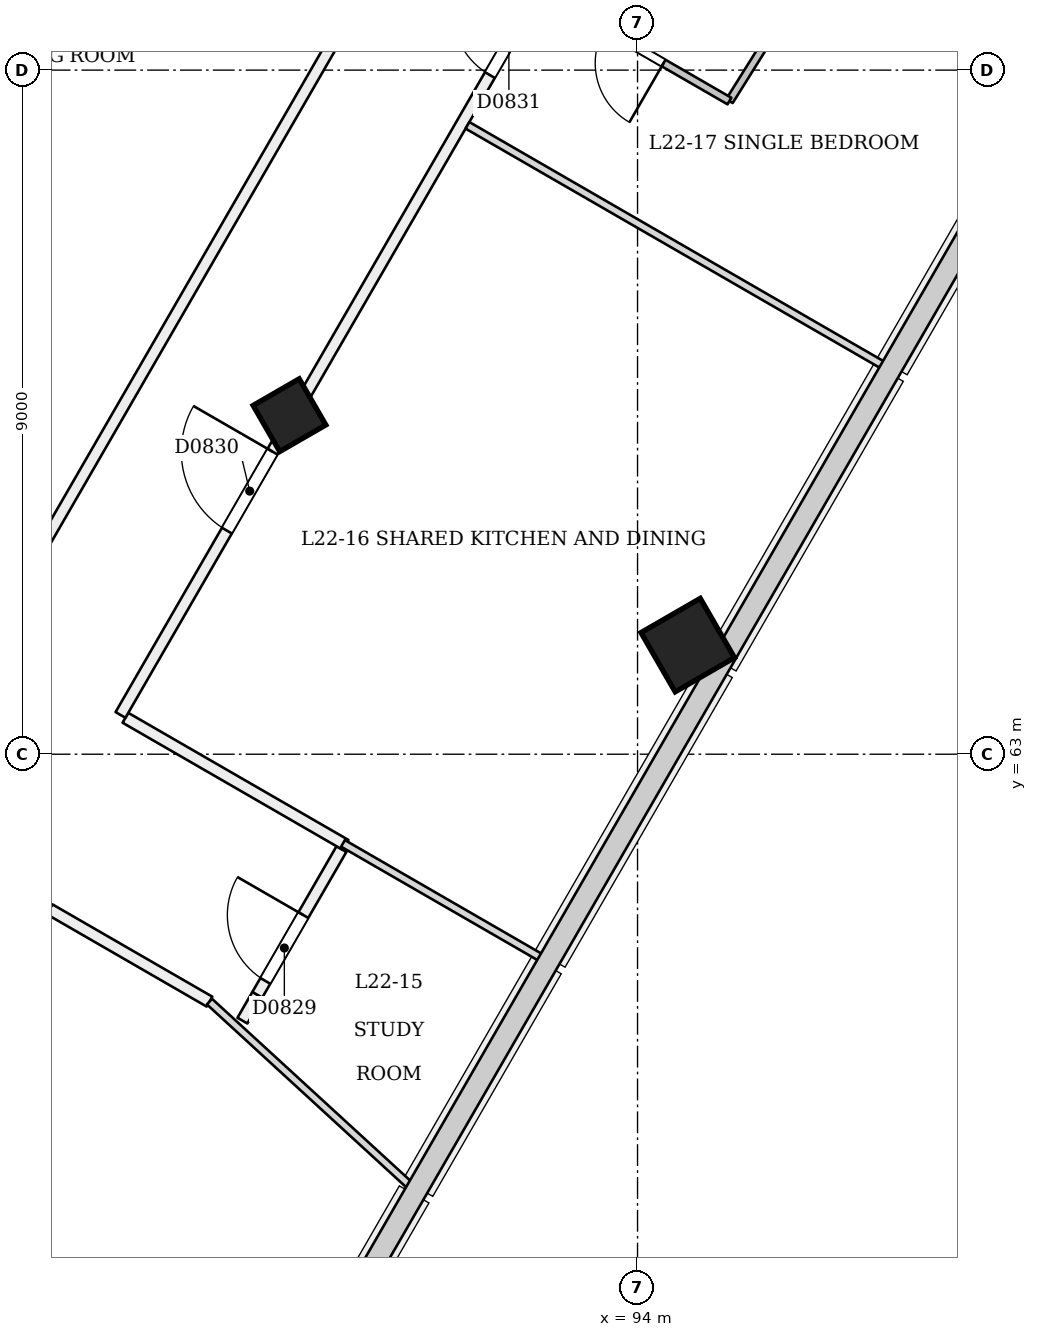
"""IFC4 building model, lengths in metres.
Left out: names, types, materials, properties, quantities, classifications, styles, units other than length and angle.
Written with IfcOpenShell. Run it as: python <this file> out.ifc"""

import sys

from ifc_helpers import new_model, si_unit, direction, frame, frame_2d, origin, origin_2d, place, context, subcontext, project, spatial, rectangle, extrude, element, fill, save


model = new_model("IFC4")
c1 = context("Model", 3, precision=1e-05, world=origin(), true_north=direction((0.0, 1.0)))
c2 = subcontext(c1, "Body", "Model", "MODEL_VIEW")
j1 = project(units=[si_unit("LENGTHUNIT", "METRE"), si_unit("PLANEANGLEUNIT", "RADIAN")], contexts=[c1])
p1 = place(None, origin())
s1 = spatial("IfcSite", under=j1, at=p1, CompositionType="ELEMENT")
p2 = place(p1, origin())
s2 = spatial("IfcBuilding", under=s1, at=p2, CompositionType="ELEMENT")
p3 = place(p2, frame((0.0, 0.0, 88.2)))
s3 = spatial("IfcBuildingStorey", under=s2, at=p3, CompositionType="ELEMENT", Elevation=88.2)
p4 = place(p3, frame((89.448, 67.413, -0.021), z_axis=(-0.02222134892, 0.038480872521, 0.999012229206), x_axis=(-0.500169969809, -0.865642163156, 0.022218160761)))
e1 = element("IfcColumn", 1, at=p4, inside=s3, PredefinedType="COLUMN", context=c2, shape_type="SweptSolid", body=[
    extrude(rectangle(XDim=0.7, YDim=0.7, at=origin_2d()), origin(), (0.0, 0.0, 1.0), 3.604),
])
p5 = place(p3, frame((94.688, 64.388, -0.027), z_axis=(-0.02215369191, 0.038413282303, 0.999016333038), x_axis=(-0.500652789846, -0.865364193428, 0.022171981242)))
e2 = element("IfcColumn", 2, at=p5, inside=s3, PredefinedType="COLUMN", context=c2, shape_type="SweptSolid", body=[
    extrude(rectangle(XDim=0.9, YDim=0.9, at=origin_2d()), origin(), (0.0, 0.0, 1.0), 3.604),
])
p6 = place(p3, frame((86.265, 60.96, 0.0), z_axis=(0.0, 0.0, 1.0), x_axis=(0.866026590519, -0.499997944509, 0.0)))
e3 = element("IfcWall", 3, at=p6, inside=s3, PredefinedType="PARTITIONING", context=c2, shape_type="SweptSolid", body=[
    extrude(rectangle(XDim=2.429, YDim=0.15, at=frame_2d((1.215, 0.0))), origin(), (0.0, 0.0, 1.0), 3.1),
])
p7 = place(p3, frame((88.802, 59.495, 0.0), z_axis=(0.0, 0.0, 1.0), x_axis=(0.500153222552, 0.865936922628, 0.0)))
e4 = element("IfcWall", 4, at=p7, inside=s3, PredefinedType="PARTITIONING", context=c2, shape_type="SweptSolid", body=[
    extrude(rectangle(XDim=0.393, YDim=0.15, at=frame_2d((0.196, 0.0))), origin(), (0.0, 0.0, 1.0), 2.6),
])
p8 = place(p3, frame((88.998, 59.835, 0.0), z_axis=(0.0, 0.0, 1.0), x_axis=(0.499970690241, 0.86604232512, 0.0)))
e5 = element("IfcWall", 5, at=p8, inside=s3, PredefinedType="PARTITIONING", context=c2, shape_type="SweptSolid", body=[
    extrude(rectangle(XDim=2.214, YDim=0.15, at=frame_2d((1.107, 0.0))), origin(), (0.0, 0.0, 1.0), 3.1),
])
p9 = place(p8, frame((0.211, 0.0, 0.0)))
e6 = element("IfcOpeningElement", 6, at=p9, cuts=e5, PredefinedType="OPENING", context=c2, shape_type="SweptSolid", body=[
    extrude(rectangle(XDim=1.0, YDim=2.1, at=frame_2d((0.5, 1.05))), frame((0.0, 0.085, 0.0), z_axis=(0.0, -1.0, 0.0), x_axis=(1.0, 0.0, 0.0)), (0.0, 0.0, 1.0), 0.171),
])
p10 = place(p3, frame((90.159, 61.807, 0.0), z_axis=(0.0, 0.0, 1.0), x_axis=(-0.866051895906, 0.499954111491, 0.0)))
e7 = element("IfcWall", 7, at=p10, inside=s3, PredefinedType="PARTITIONING", context=c2, shape_type="SweptSolid", body=[
    extrude(rectangle(XDim=3.345, YDim=0.15, at=frame_2d((1.672, 0.0))), origin(), (0.0, 0.0, 1.0), 3.1),
])
p11 = place(p3, frame((87.198, 63.517, 0.0), z_axis=(0.0, 0.0, 1.0), x_axis=(0.499999136801, 0.866025902152, 0.0)))
e8 = element("IfcWall", 8, at=p11, inside=s3, PredefinedType="PARTITIONING", context=c2, shape_type="SweptSolid", body=[
    extrude(rectangle(XDim=39.209, YDim=0.15, at=frame_2d((19.604, 0.0))), origin(), (0.0, 0.0, 1.0), 2.7),
])
p12 = place(p11, frame((2.8, 0.0, 0.0)))
e9 = element("IfcOpeningElement", 9, at=p12, cuts=e8, PredefinedType="OPENING", context=c2, shape_type="SweptSolid", body=[
    extrude(rectangle(XDim=1.2, YDim=2.1, at=frame_2d((0.6, 1.05))), frame((0.0, 0.085, 0.0), z_axis=(0.0, -1.0, 0.0), x_axis=(1.0, 0.0, 0.0)), (0.0, 0.0, 1.0), 0.171),
])
p13 = place(p11, frame((9.72, 0.0, 0.0)))
e10 = element("IfcOpeningElement", 10, at=p13, cuts=e8, PredefinedType="OPENING", context=c2, shape_type="SweptSolid", body=[
    extrude(rectangle(XDim=1.0, YDim=2.1, at=frame_2d((0.5, 1.05))), frame((0.0, 0.085, 0.0), z_axis=(0.0, -1.0, 0.0), x_axis=(1.0, 0.0, 0.0)), (0.0, 0.0, 1.0), 0.171),
])
p14 = place(p11, frame((16.395, 0.0, 0.0)))
e11 = element("IfcOpeningElement", 11, at=p14, cuts=e8, PredefinedType="OPENING", context=c2, shape_type="SweptSolid", body=[
    extrude(rectangle(XDim=1.0, YDim=2.1, at=frame_2d((0.5, 1.05))), frame((0.0, 0.085, 0.0), z_axis=(0.0, -1.0, 0.0), x_axis=(1.0, 0.0, 0.0)), (0.0, 0.0, 1.0), 0.171),
])
p15 = place(p11, frame((19.75, 0.0, 0.0)))
e12 = element("IfcOpeningElement", 12, at=p15, cuts=e8, PredefinedType="OPENING", context=c2, shape_type="SweptSolid", body=[
    extrude(rectangle(XDim=1.0, YDim=2.1, at=frame_2d((0.5, 1.05))), frame((0.0, 0.085, 0.0), z_axis=(0.0, -1.0, 0.0), x_axis=(1.0, 0.0, 0.0)), (0.0, 0.0, 1.0), 0.171),
])
p16 = place(p11, frame((25.395, 0.0, 0.0)))
e13 = element("IfcOpeningElement", 13, at=p16, cuts=e8, PredefinedType="OPENING", context=c2, shape_type="SweptSolid", body=[
    extrude(rectangle(XDim=1.0, YDim=2.1, at=frame_2d((0.5, 1.05))), frame((0.0, 0.085, 0.0), z_axis=(0.0, -1.0, 0.0), x_axis=(1.0, 0.0, 0.0)), (0.0, 0.0, 1.0), 0.171),
])
p17 = place(p11, frame((29.8, 0.0, 0.0)))
e14 = element("IfcOpeningElement", 14, at=p17, cuts=e8, PredefinedType="OPENING", context=c2, shape_type="SweptSolid", body=[
    extrude(rectangle(XDim=1.2, YDim=2.1, at=frame_2d((0.6, 1.05))), frame((0.0, 0.085, 0.0), z_axis=(0.0, -1.0, 0.0), x_axis=(1.0, 0.0, 0.0)), (0.0, 0.0, 1.0), 0.171),
])
p18 = place(p11, frame((37.225, 0.0, 0.0)))
e15 = element("IfcOpeningElement", 15, at=p18, cuts=e8, PredefinedType="OPENING", context=c2, shape_type="SweptSolid", body=[
    extrude(rectangle(XDim=1.0, YDim=2.1, at=frame_2d((0.5, 1.05))), frame((0.0, 0.085, 0.0), z_axis=(0.0, -1.0, 0.0), x_axis=(1.0, 0.0, 0.0)), (0.0, 0.0, 1.0), 0.171),
])
p19 = place(p3, frame((100.409, 90.4, 0.0), z_axis=(0.0, 0.0, 1.0), x_axis=(-0.500001354695, -0.86602462165, 0.0)))
e16 = element("IfcWall", 16, at=p19, inside=s3, PredefinedType="PARTITIONING", context=c2, shape_type="SweptSolid", body=[
    extrude(rectangle(XDim=30.688, YDim=0.15, at=frame_2d((15.344, 0.0))), origin(), (0.0, 0.0, 1.0), 3.1),
])
p20 = place(p19, frame((13.301, 0.0, 0.0)))
e17 = element("IfcOpeningElement", 17, at=p20, cuts=e16, PredefinedType="OPENING", context=c2, shape_type="SweptSolid", body=[
    extrude(rectangle(XDim=1.2, YDim=2.1, at=frame_2d((0.6, 1.05))), frame((0.0, 0.085, 0.0), z_axis=(0.0, -1.0, 0.0), x_axis=(1.0, 0.0, 0.0)), (0.0, 0.0, 1.0), 0.171),
])
p21 = place(p19, frame((4.95, 0.0, 0.0)))
e18 = element("IfcOpeningElement", 18, at=p21, cuts=e16, PredefinedType="OPENING", context=c2, shape_type="SweptSolid", body=[
    extrude(rectangle(XDim=1.2, YDim=2.1, at=frame_2d((0.6, 1.05))), frame((0.0, 0.085, 0.0), z_axis=(0.0, -1.0, 0.0), x_axis=(1.0, 0.0, 0.0)), (0.0, 0.0, 1.0), 0.171),
])
p22 = place(p3, frame((91.027, 57.307, 0.0), z_axis=(0.0, 0.0, 1.0), x_axis=(-0.736909652075, 0.675991246007, 0.0)))
e19 = element("IfcWall", 19, at=p22, inside=s3, PredefinedType="PARTITIONING", context=c2, shape_type="SweptSolid", body=[
    extrude(rectangle(XDim=3.607, YDim=0.1, at=frame_2d((1.803, 0.0))), origin(), (0.0, 0.0, 1.0), 2.6),
])
p23 = place(p3, frame((92.758, 60.307, 0.0), z_axis=(0.0, 0.0, 1.0), x_axis=(-0.865995682262, 0.500051475653, 0.0)))
e20 = element("IfcWall", 20, at=p23, inside=s3, PredefinedType="PARTITIONING", context=c2, shape_type="SweptSolid", body=[
    extrude(rectangle(XDim=3.04, YDim=0.1, at=frame_2d((1.52, 0.0))), origin(), (0.0, 0.0, 1.0), 2.6),
])
p24 = place(p3, frame((97.258, 68.101, 0.0), z_axis=(0.0, 0.0, 1.0), x_axis=(-0.866025401434, 0.500000004071, 0.0)))
e21 = element("IfcWall", 21, at=p24, inside=s3, PredefinedType="PARTITIONING", context=c2, shape_type="SweptSolid", body=[
    extrude(rectangle(XDim=6.345, YDim=0.1, at=frame_2d((3.173, 0.0))), origin(), (0.0, 0.0, 1.0), 2.6),
])
p25 = place(p3, frame((96.696, 73.968, 0.0), z_axis=(0.0, 0.0, 1.0), x_axis=(-0.530562750291, -0.847645661821, 0.0)))
e22 = element("IfcWall", 22, at=p25, inside=s3, PredefinedType="PARTITIONING", context=c2, shape_type="SweptSolid", body=[
    extrude(rectangle(XDim=2.802, YDim=0.1, at=frame_2d((1.401, 0.0))), origin(), (0.0, 0.0, 1.0), 2.7),
])
p26 = place(p3, frame((95.209, 71.593, 0.0), z_axis=(0.0, 0.0, 1.0), x_axis=(-0.866011447264, 0.500024172624, 0.0)))
e23 = element("IfcWall", 23, at=p26, inside=s3, PredefinedType="PARTITIONING", context=c2, shape_type="SweptSolid", body=[
    extrude(rectangle(XDim=2.825, YDim=0.1, at=frame_2d((1.413, 0.0))), origin(), (0.0, 0.0, 1.0), 3.1),
])
p27 = place(p26, frame((1.0, 0.0, 0.0)))
e24 = element("IfcOpeningElement", 24, at=p27, cuts=e23, PredefinedType="OPENING", context=c2, shape_type="SweptSolid", body=[
    extrude(rectangle(XDim=0.9, YDim=2.1, at=frame_2d((0.45, 1.05))), frame((0.0, 0.061, 0.0), z_axis=(0.0, -1.0, 0.0), x_axis=(1.0, 0.0, 0.0)), (0.0, 0.0, 1.0), 0.121),
])
p28 = place(p3, frame((99.49, 72.008, 0.0), z_axis=(0.0, 0.0, 1.0), x_axis=(-0.865989465428, 0.500062241894, 0.0)))
e25 = element("IfcWall", 25, at=p28, inside=s3, PredefinedType="PARTITIONING", context=c2, shape_type="SweptSolid", body=[
    extrude(rectangle(XDim=3.4, YDim=0.15, at=frame_2d((1.7, 0.0))), origin(), (0.0, 0.0, 1.0), 2.6),
])
p29 = place(p9, origin())
e26 = element("IfcDoor", 26, at=p29, inside=s3, OperationType="SINGLE_SWING_RIGHT", PredefinedType="NOTDEFINED", context=c2, shape_type="SweptSolid", body=[
    extrude(rectangle(XDim=1.0, YDim=2.1, at=frame_2d((0.5, 1.05))), frame((0.0, 0.025, 0.0), z_axis=(0.0, -1.0, 0.0), x_axis=(1.0, 0.0, 0.0)), (0.0, 0.0, 1.0), 0.05),
])
fill(e6, e26)
p30 = place(p12, origin())
e27 = element("IfcDoor", 27, at=p30, inside=s3, OperationType="SINGLE_SWING_RIGHT", PredefinedType="NOTDEFINED", context=c2, shape_type="SweptSolid", body=[
    extrude(rectangle(XDim=1.2, YDim=2.1, at=frame_2d((0.6, 1.05))), frame((0.0, 0.025, 0.0), z_axis=(0.0, -1.0, 0.0), x_axis=(1.0, 0.0, 0.0)), (0.0, 0.0, 1.0), 0.05),
])
fill(e9, e27)
p31 = place(p13, origin())
e28 = element("IfcDoor", 28, at=p31, inside=s3, OperationType="SINGLE_SWING_RIGHT", PredefinedType="NOTDEFINED", context=c2, shape_type="SweptSolid", body=[
    extrude(rectangle(XDim=1.0, YDim=2.1, at=frame_2d((0.5, 1.05))), frame((0.0, 0.025, 0.0), z_axis=(0.0, -1.0, 0.0), x_axis=(1.0, 0.0, 0.0)), (0.0, 0.0, 1.0), 0.05),
])
fill(e10, e28)
p32 = place(p27, origin())
e29 = element("IfcDoor", 29, at=p32, inside=s3, OperationType="SINGLE_SWING_LEFT", PredefinedType="NOTDEFINED", context=c2, shape_type="SweptSolid", body=[
    extrude(rectangle(XDim=0.9, YDim=2.1, at=frame_2d((0.45, 1.05))), frame((0.0, 0.025, 0.0), z_axis=(0.0, -1.0, 0.0), x_axis=(1.0, 0.0, 0.0)), (0.0, 0.0, 1.0), 0.05),
])
fill(e24, e29)
save(model, sys.argv[1])
